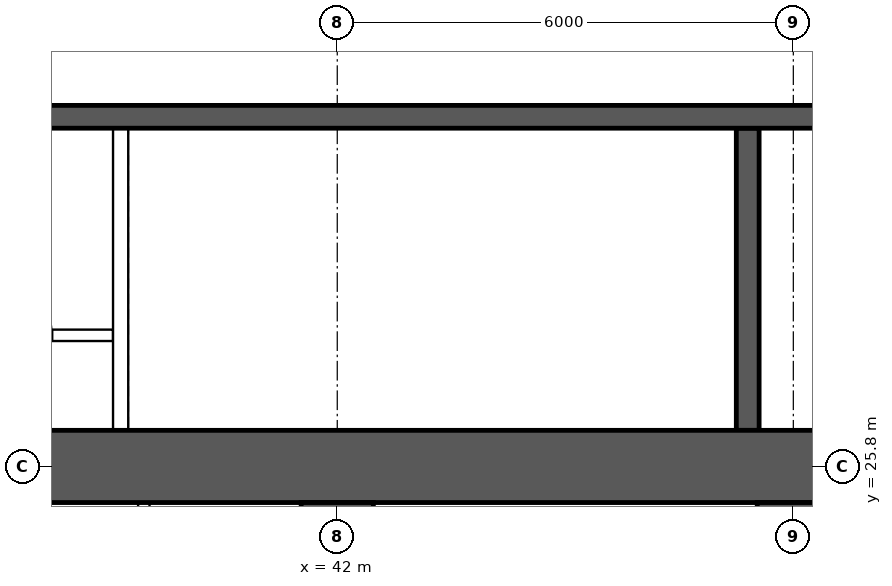
"""IFC4 building model, lengths in metres.
Left out: names, types, materials, properties, quantities, classifications, styles, units other than length and angle.
Written with IfcOpenShell. Run it as: python <this file> out.ifc"""

import sys

from ifc_helpers import new_model, si_unit, direction, frame, frame_2d, origin, place, context, subcontext, project, spatial, rectangle, extrude, element, save


model = new_model("IFC4")
c1 = context("Model", 3, precision=1e-05, world=origin(), true_north=direction((0.0, 1.0)))
c2 = subcontext(c1, "Body", "Model", "MODEL_VIEW")
j1 = project(units=[si_unit("LENGTHUNIT", "METRE"), si_unit("PLANEANGLEUNIT", "RADIAN")], contexts=[c1])
p1 = place(None, origin())
s1 = spatial("IfcSite", under=j1, at=p1, CompositionType="ELEMENT")
p2 = place(p1, origin())
s2 = spatial("IfcBuilding", under=s1, at=p2, CompositionType="ELEMENT")
p3 = place(p2, frame((0.0, 0.0, 91.9)))
s3 = spatial("IfcBuildingStorey", under=s2, at=p3, CompositionType="ELEMENT", Elevation=91.9)
p4 = place(p3, frame((18.0, 25.8, 0.0), z_axis=(0.0, 0.0, 1.0), x_axis=(1.0, 0.0, 0.0)))
e1 = element("IfcWall", 1, at=p4, inside=s3, PredefinedType="SHEAR", context=c2, shape_type="SweptSolid", body=[
    extrude(rectangle(XDim=48.0, YDim=0.95, at=frame_2d((24.0, 0.0))), origin(), (0.0, 0.0, 1.0), 3.75),
])
p5 = place(p3, frame((18.475, 30.4, 0.0), z_axis=(0.0, 0.0, 1.0), x_axis=(1.0, 0.0, 0.0)))
e2 = element("IfcWall", 2, at=p5, inside=s3, PredefinedType="SHEAR", context=c2, shape_type="SweptSolid", body=[
    extrude(rectangle(XDim=47.05, YDim=0.3, at=frame_2d((23.525, 0.0))), origin(), (0.0, 0.0, 1.0), 3.75),
])
p6 = place(p5, frame((0.4, 0.0, 0.0)))
e3 = element("IfcOpeningElement", 3, at=p6, cuts=e2, PredefinedType="OPENING", context=c2, shape_type="SweptSolid", body=[
    extrude(rectangle(XDim=1.0, YDim=2.1, at=frame_2d((0.5, 1.05))), frame((0.0, 0.16, 0.0), z_axis=(0.0, -1.0, 0.0), x_axis=(1.0, 0.0, 0.0)), (0.0, 0.0, 1.0), 0.32),
])
p7 = place(p5, frame((45.65, 0.0, 0.0)))
e4 = element("IfcOpeningElement", 4, at=p7, cuts=e2, PredefinedType="OPENING", context=c2, shape_type="SweptSolid", body=[
    extrude(rectangle(XDim=1.0, YDim=2.1, at=frame_2d((0.5, 1.05))), frame((0.0, 0.16, 0.0), z_axis=(0.0, -1.0, 0.0), x_axis=(1.0, 0.0, 0.0)), (0.0, 0.0, 1.0), 0.32),
])
p8 = place(p5, frame((8.275, 0.0, 0.0)))
e5 = element("IfcOpeningElement", 5, at=p8, cuts=e2, PredefinedType="OPENING", context=c2, shape_type="SweptSolid", body=[
    extrude(rectangle(XDim=1.1, YDim=2.1, at=frame_2d((0.55, 1.05))), frame((0.0, 0.16, 0.0), z_axis=(0.0, -1.0, 0.0), x_axis=(1.0, 0.0, 0.0)), (0.0, 0.0, 1.0), 0.32),
])
p9 = place(p5, frame((10.875, 0.0, 0.0)))
e6 = element("IfcOpeningElement", 6, at=p9, cuts=e2, PredefinedType="OPENING", context=c2, shape_type="SweptSolid", body=[
    extrude(rectangle(XDim=1.1, YDim=2.1, at=frame_2d((0.55, 1.05))), frame((0.0, 0.16, 0.0), z_axis=(0.0, -1.0, 0.0), x_axis=(1.0, 0.0, 0.0)), (0.0, 0.0, 1.0), 0.32),
])
p10 = place(p5, frame((13.475, 0.0, 0.0)))
e7 = element("IfcOpeningElement", 7, at=p10, cuts=e2, PredefinedType="OPENING", context=c2, shape_type="SweptSolid", body=[
    extrude(rectangle(XDim=1.1, YDim=2.1, at=frame_2d((0.55, 1.05))), frame((0.0, 0.16, 0.0), z_axis=(0.0, -1.0, 0.0), x_axis=(1.0, 0.0, 0.0)), (0.0, 0.0, 1.0), 0.32),
])
p11 = place(p5, frame((16.075, 0.0, 0.0)))
e8 = element("IfcOpeningElement", 8, at=p11, cuts=e2, PredefinedType="OPENING", context=c2, shape_type="SweptSolid", body=[
    extrude(rectangle(XDim=1.1, YDim=2.1, at=frame_2d((0.55, 1.05))), frame((0.0, 0.16, 0.0), z_axis=(0.0, -1.0, 0.0), x_axis=(1.0, 0.0, 0.0)), (0.0, 0.0, 1.0), 0.32),
])
p12 = place(p5, frame((18.85, 0.0, 0.0)))
e9 = element("IfcOpeningElement", 9, at=p12, cuts=e2, PredefinedType="OPENING", context=c2, shape_type="SweptSolid", body=[
    extrude(rectangle(XDim=0.9, YDim=2.1, at=frame_2d((0.45, 1.05))), frame((0.0, 0.16, 0.0), z_axis=(0.0, -1.0, 0.0), x_axis=(1.0, 0.0, 0.0)), (0.0, 0.0, 1.0), 0.32),
])
p13 = place(p5, frame((30.142, 0.0, 0.0)))
e10 = element("IfcOpeningElement", 10, at=p13, cuts=e2, PredefinedType="OPENING", context=c2, shape_type="SweptSolid", body=[
    extrude(rectangle(XDim=1.1, YDim=2.1, at=frame_2d((0.55, 1.05))), frame((0.0, 0.16, 0.0), z_axis=(0.0, -1.0, 0.0), x_axis=(1.0, 0.0, 0.0)), (0.0, 0.0, 1.0), 0.32),
])
p14 = place(p5, frame((33.675, 0.0, 0.0)))
e11 = element("IfcOpeningElement", 11, at=p14, cuts=e2, PredefinedType="OPENING", context=c2, shape_type="SweptSolid", body=[
    extrude(rectangle(XDim=1.1, YDim=2.1, at=frame_2d((0.55, 1.05))), frame((0.0, 0.16, 0.0), z_axis=(0.0, -1.0, 0.0), x_axis=(1.0, 0.0, 0.0)), (0.0, 0.0, 1.0), 0.32),
])
p15 = place(p5, frame((37.208, 0.0, 0.0)))
e12 = element("IfcOpeningElement", 12, at=p15, cuts=e2, PredefinedType="OPENING", context=c2, shape_type="SweptSolid", body=[
    extrude(rectangle(XDim=1.1, YDim=2.1, at=frame_2d((0.55, 1.05))), frame((0.0, 0.16, 0.0), z_axis=(0.0, -1.0, 0.0), x_axis=(1.0, 0.0, 0.0)), (0.0, 0.0, 1.0), 0.32),
])
p16 = place(p3, frame((47.4, 26.275, 0.0), z_axis=(0.0, 0.0, 1.0), x_axis=(0.0, 1.0, 0.0)))
e13 = element("IfcWall", 13, at=p16, inside=s3, PredefinedType="SHEAR", context=c2, shape_type="SweptSolid", body=[
    extrude(rectangle(XDim=3.975, YDim=0.3, at=frame_2d((1.988, 0.0))), origin(), (0.0, 0.0, 1.0), 3.75),
])
for number, where, z_axis, x_axis in (
    (14, (42.0, 16.0, 0.0), (0.0, 0.0, 1.0), (0.0, 1.0, 0.0)),
    (15, (48.0, 16.0, 0.0), (0.0, 0.0, 1.0), (0.0, 1.0, 0.0)),
):
    element("IfcWall", number, at=place(p3, frame(where, z_axis=z_axis, x_axis=x_axis)), inside=s3, PredefinedType="SHEAR", context=c2, shape_type="SweptSolid", body=[
        extrude(rectangle(XDim=9.325, YDim=0.95, at=frame_2d((4.663, 0.0))), origin(), (0.0, 0.0, 1.0), 3.75),
    ])
p17 = place(p3, frame((36.55, 27.525, 0.0), z_axis=(0.0, 0.0, 1.0), x_axis=(1.0, 0.0, 0.0)))
e16 = element("IfcWall", 16, at=p17, inside=s3, PredefinedType="SOLIDWALL", context=c2, shape_type="SweptSolid", body=[
    extrude(rectangle(XDim=2.5, YDim=0.15, at=frame_2d((1.25, 0.0))), origin(), (0.0, 0.0, 1.0), 3.5),
])
p18 = place(p17, frame((0.8, 0.0, 0.0)))
e17 = element("IfcOpeningElement", 17, at=p18, cuts=e16, PredefinedType="OPENING", context=c2, shape_type="SweptSolid", body=[
    extrude(rectangle(XDim=0.9, YDim=2.1, at=frame_2d((0.45, 1.05))), frame((0.0, 0.085, 0.0), z_axis=(0.0, -1.0, 0.0), x_axis=(1.0, 0.0, 0.0)), (0.0, 0.0, 1.0), 0.17),
])
p19 = place(p3, frame((39.15, 26.275, 0.0), z_axis=(0.0, 0.0, 1.0), x_axis=(0.0, 1.0, 0.0)))
e18 = element("IfcWall", 18, at=p19, inside=s3, PredefinedType="SOLIDWALL", context=c2, shape_type="SweptSolid", body=[
    extrude(rectangle(XDim=3.975, YDim=0.2, at=frame_2d((1.988, 0.0))), origin(), (0.0, 0.0, 1.0), 3.5),
])
p20 = place(p3, frame((39.455, 16.1, 0.0), z_axis=(0.0, 0.0, 1.0), x_axis=(0.0, 1.0, 0.0)))
e19 = element("IfcWall", 19, at=p20, inside=s3, PredefinedType="PARTITIONING", context=c2, shape_type="SweptSolid", body=[
    extrude(rectangle(XDim=9.225, YDim=0.15, at=frame_2d((4.612, 0.0))), origin(), (0.0, 0.0, 1.0), 3.5),
])
save(model, sys.argv[1])
